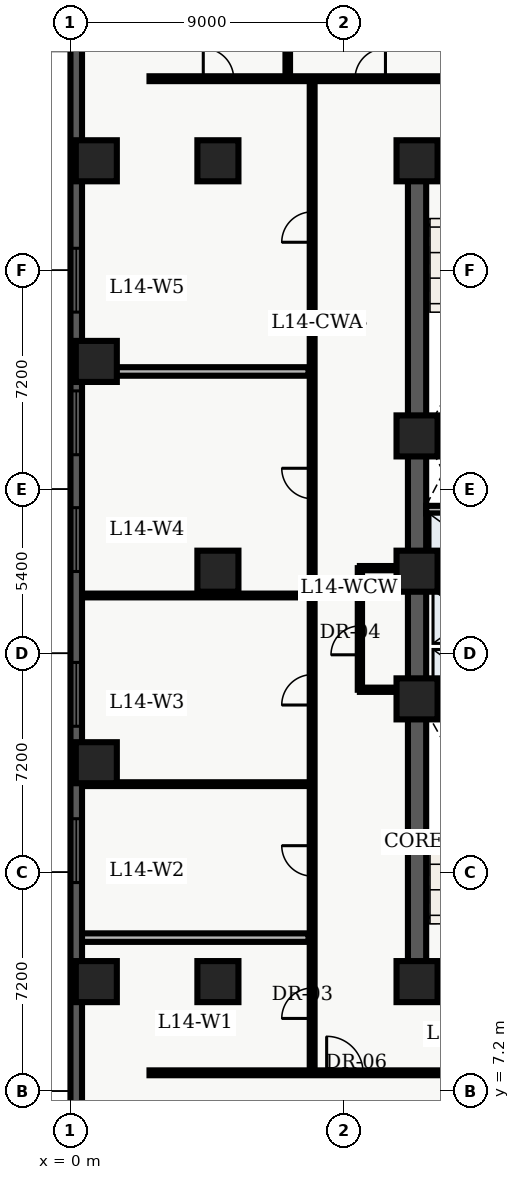
"""IFC4 building model, lengths in metres.
Left out: names, types, materials, properties, quantities, classifications, styles, units other than length and angle.
Written with IfcOpenShell. Run it as: python <this file> out.ifc"""

import sys

from ifc_helpers import new_model, entity, si_unit, converted_unit, direction, frame, origin_with_axes, origin_2d_with_axis, place, context, subcontext, project, spatial, polyline, rectangle, outline, extrude, element, fill, save


model = new_model("IFC4")
c1 = context("Model", 3, precision=1e-05, world=origin_with_axes(), true_north=direction((0.0, 1.0)))
c2 = subcontext(c1, "Body", "Model", "MODEL_VIEW")
j1 = project(units=[si_unit("LENGTHUNIT", "METRE"), converted_unit("PLANEANGLEUNIT", "DEGREE", entity("IfcPlaneAngleMeasure", 0.017), si_unit("PLANEANGLEUNIT", "RADIAN"), dimensions=[0, 0, 0, 0, 0, 0, 0])], contexts=[c1])
p1 = place(None, origin_with_axes())
s1 = spatial("IfcSite", under=j1, at=p1, CompositionType="ELEMENT")
p2 = place(p1, origin_with_axes())
s2 = spatial("IfcBuilding", under=s1, at=p2, CompositionType="ELEMENT")
p3 = place(p2, frame((0.0, 0.0, 60.0), z_axis=(0.0, 0.0, 1.0), x_axis=(1.0, 0.0, 0.0)))
s3 = spatial("IfcBuildingStorey", under=s2, at=p3, CompositionType="ELEMENT", Elevation=60.0)
p4 = place(p3, frame((11.4, 10.8, 0.0), z_axis=(0.0, 0.0, 1.0), x_axis=(0.0, 1.0, 0.0)))
e1 = element("IfcWall", 1, at=p4, inside=s3, PredefinedType="SHEAR", context=c2, shape_type="SweptSolid", body=[
    extrude(outline(polyline([(0.0, -0.3), (27.0, -0.3), (27.0, 0.3), (0.0, 0.3), (0.0, -0.3)])), origin_with_axes(), (0.0, 0.0, 1.0), 3.66),
])
p5 = place(p3, frame((11.4, 10.8, 0.0), z_axis=(0.0, 0.0, 1.0), x_axis=(1.0, 0.0, 0.0)))
e2 = element("IfcWall", 2, at=p5, inside=s3, PredefinedType="SHEAR", context=c2, shape_type="SweptSolid", body=[
    extrude(outline(polyline([(0.0, -0.3), (7.2, -0.3), (7.2, 0.3), (0.0, 0.3), (0.0, -0.3)])), origin_with_axes(), (0.0, 0.0, 1.0), 3.66),
])
p6 = place(p5, frame((2.625, 0.0, 0.0), z_axis=(0.0, 0.0, 1.0), x_axis=(1.0, 0.0, 0.0)))
e3 = element("IfcOpeningElement", 3, at=p6, cuts=e2, PredefinedType="OPENING", context=c2, shape_type="SweptSolid", body=[
    extrude(rectangle(XDim=1.05, YDim=0.62, at=origin_2d_with_axis()), origin_with_axes(), (0.0, 0.0, 1.0), 2.15),
])
p7 = place(p3, frame((11.4, 37.8, 0.0), z_axis=(0.0, 0.0, 1.0), x_axis=(1.0, 0.0, 0.0)))
e4 = element("IfcWall", 4, at=p7, inside=s3, PredefinedType="SHEAR", context=c2, shape_type="SweptSolid", body=[
    extrude(outline(polyline([(0.0, -0.3), (7.2, -0.3), (7.2, 0.3), (0.0, 0.3), (0.0, -0.3)])), origin_with_axes(), (0.0, 0.0, 1.0), 3.66),
])
p8 = place(p7, frame((2.625, 0.0, 0.0), z_axis=(0.0, 0.0, 1.0), x_axis=(1.0, 0.0, 0.0)))
e5 = element("IfcOpeningElement", 5, at=p8, cuts=e4, PredefinedType="OPENING", context=c2, shape_type="SweptSolid", body=[
    extrude(rectangle(XDim=1.05, YDim=0.62, at=origin_2d_with_axis()), origin_with_axes(), (0.0, 0.0, 1.0), 2.15),
])
for number, where, z_axis, x_axis in (
    (6, (11.7, 19.825, 0.0), (0.0, 0.0, 1.0), (1.0, 0.0, 0.0)),
    (7, (11.7, 28.775, 0.0), (0.0, 0.0, 1.0), (1.0, 0.0, 0.0)),
):
    element("IfcWall", number, at=place(p3, frame(where, z_axis=z_axis, x_axis=x_axis)), inside=s3, PredefinedType="SHEAR", context=c2, shape_type="SweptSolid", body=[
        extrude(outline(polyline([(0.0, -0.125), (6.6, -0.125), (6.6, 0.125), (0.0, 0.125), (0.0, -0.125)])), origin_with_axes(), (0.0, 0.0, 1.0), 3.66),
    ])
p9 = place(p3, frame((11.7, 24.1, 0.0), z_axis=(0.0, 0.0, 1.0), x_axis=(1.0, 0.0, 0.0)))
e8 = element("IfcWall", 8, at=p9, inside=s3, PredefinedType="SOLIDWALL", context=c2, shape_type="SweptSolid", body=[
    extrude(outline(polyline([(0.0, -0.125), (6.6, -0.125), (6.6, 0.125), (0.0, 0.125), (0.0, -0.125)])), origin_with_axes(), (0.0, 0.0, 1.0), 2.7),
])
p10 = place(p9, frame((3.75, 0.0, 0.0), z_axis=(0.0, 0.0, 1.0), x_axis=(1.0, 0.0, 0.0)))
e9 = element("IfcOpeningElement", 9, at=p10, cuts=e8, PredefinedType="OPENING", context=c2, shape_type="SweptSolid", body=[
    extrude(rectangle(XDim=0.9, YDim=0.27, at=origin_2d_with_axis()), origin_with_axes(), (0.0, 0.0, 1.0), 2.15),
])
p11 = place(p3, frame((11.7, 26.325, 0.0), z_axis=(0.0, 0.0, 1.0), x_axis=(1.0, 0.0, 0.0)))
e10 = element("IfcWall", 10, at=p11, inside=s3, PredefinedType="SOLIDWALL", context=c2, shape_type="SweptSolid", body=[
    extrude(outline(polyline([(0.0, -0.125), (6.6, -0.125), (6.6, 0.125), (0.0, 0.125), (0.0, -0.125)])), origin_with_axes(), (0.0, 0.0, 1.0), 2.7),
])
p12 = place(p11, frame((3.5, 0.0, 0.0), z_axis=(0.0, 0.0, 1.0), x_axis=(1.0, 0.0, 0.0)))
e11 = element("IfcOpeningElement", 11, at=p12, cuts=e10, PredefinedType="OPENING", context=c2, shape_type="SweptSolid", body=[
    extrude(rectangle(XDim=0.9, YDim=0.27, at=origin_2d_with_axis()), origin_with_axes(), (0.0, 0.0, 1.0), 2.15),
])
for number, where, z_axis, x_axis in (
    (12, (11.4, 10.8, 0.0), (0.0, 0.0, 1.0), (1.0, 0.0, 0.0)),
    (13, (11.4, 20.1, 0.0), (0.0, 0.0, 1.0), (1.0, 0.0, 0.0)),
    (14, (11.4, 24.3, 0.0), (0.0, 0.0, 1.0), (1.0, 0.0, 0.0)),
    (15, (11.4, 28.75, 0.0), (0.0, 0.0, 1.0), (1.0, 0.0, 0.0)),
    (16, (11.4, 37.8, 0.0), (0.0, 0.0, 1.0), (1.0, 0.0, 0.0)),
    (17, (4.85, 10.8, 0.0), (0.0, 0.0, 1.0), (1.0, 0.0, 0.0)),
    (18, (4.85, 24.3, 0.0), (0.0, 0.0, 1.0), (1.0, 0.0, 0.0)),
    (19, (4.85, 37.8, 0.0), (0.0, 0.0, 1.0), (1.0, 0.0, 0.0)),
    (20, (0.85, 10.8, 0.0), (0.0, 0.0, 1.0), (1.0, 0.0, 0.0)),
    (21, (0.85, 18.0, 0.0), (0.0, 0.0, 1.0), (1.0, 0.0, 0.0)),
    (22, (0.85, 31.2, 0.0), (0.0, 0.0, 1.0), (1.0, 0.0, 0.0)),
    (23, (0.85, 37.8, 0.0), (0.0, 0.0, 1.0), (1.0, 0.0, 0.0)),
):
    element("IfcColumn", number, at=place(p3, frame(where, z_axis=z_axis, x_axis=x_axis)), inside=s3, PredefinedType="COLUMN", context=c2, shape_type="SweptSolid", body=[
        extrude(rectangle(XDim=1.35, YDim=1.35, at=origin_2d_with_axis()), origin_with_axes(), (0.0, 0.0, 1.0), 3.9),
    ])
p13 = place(p3, frame((9.52, 20.4, 0.0), z_axis=(0.0, 0.0, 1.0), x_axis=(0.0, 1.0, 0.0)))
e24 = element("IfcWall", 24, at=p13, inside=s3, PredefinedType="PARTITIONING", context=c2, shape_type="SweptSolid", body=[
    extrude(outline(polyline([(0.0, -0.07), (4.0, -0.07), (4.0, 0.07), (0.0, 0.07), (0.0, -0.07)])), origin_with_axes(), (0.0, 0.0, 1.0), 2.7),
])
p14 = place(p13, frame((1.625, 0.0, 0.0), z_axis=(0.0, 0.0, 1.0), x_axis=(1.0, 0.0, 0.0)))
e25 = element("IfcOpeningElement", 25, at=p14, cuts=e24, PredefinedType="OPENING", context=c2, shape_type="SweptSolid", body=[
    extrude(rectangle(XDim=0.95, YDim=0.16, at=origin_2d_with_axis()), origin_with_axes(), (0.0, 0.0, 1.0), 2.15),
])
for number, where, z_axis, x_axis in (
    (26, (9.52, 20.4, 0.0), (0.0, 0.0, 1.0), (1.0, 0.0, 0.0)),
    (27, (9.52, 24.4, 0.0), (0.0, 0.0, 1.0), (1.0, 0.0, 0.0)),
):
    element("IfcWall", number, at=place(p3, frame(where, z_axis=z_axis, x_axis=x_axis)), inside=s3, PredefinedType="PARTITIONING", context=c2, shape_type="SweptSolid", body=[
        extrude(outline(polyline([(0.0, -0.07), (1.58, -0.07), (1.58, 0.07), (0.0, 0.07), (0.0, -0.07)])), origin_with_axes(), (0.0, 0.0, 1.0), 2.7),
    ])
p15 = place(p3, frame((2.6, 7.8, 0.0), z_axis=(0.0, 0.0, 1.0), x_axis=(1.0, 0.0, 0.0)))
e28 = element("IfcWall", 28, at=p15, inside=s3, PredefinedType="PARTITIONING", context=c2, shape_type="SweptSolid", body=[
    extrude(outline(polyline([(0.0, -0.08), (18.55, -0.08), (18.55, 0.08), (0.0, 0.08), (0.0, -0.08)])), origin_with_axes(), (0.0, 0.0, 1.0), 2.7),
])
p16 = place(p15, frame((6.426, 0.0, 0.0), z_axis=(0.0, 0.0, 1.0), x_axis=(1.0, 0.0, 0.0)))
e29 = element("IfcOpeningElement", 29, at=p16, cuts=e28, PredefinedType="OPENING", context=c2, shape_type="SweptSolid", body=[
    extrude(rectangle(XDim=1.2, YDim=0.18, at=origin_2d_with_axis()), origin_with_axes(), (0.0, 0.0, 1.0), 2.2),
])
p17 = place(p15, frame((15.681, 0.0, 0.0), z_axis=(0.0, 0.0, 1.0), x_axis=(1.0, 0.0, 0.0)))
e30 = element("IfcOpeningElement", 30, at=p17, cuts=e28, PredefinedType="OPENING", context=c2, shape_type="SweptSolid", body=[
    extrude(rectangle(XDim=1.0, YDim=0.18, at=origin_2d_with_axis()), origin_with_axes(), (0.0, 0.0, 1.0), 2.15),
])
p18 = place(p3, frame((2.6, 40.5, 0.0), z_axis=(0.0, 0.0, 1.0), x_axis=(1.0, 0.0, 0.0)))
e31 = element("IfcWall", 31, at=p18, inside=s3, PredefinedType="PARTITIONING", context=c2, shape_type="SweptSolid", body=[
    extrude(outline(polyline([(0.0, -0.08), (18.65, -0.08), (18.65, 0.08), (0.0, 0.08), (0.0, -0.08)])), origin_with_axes(), (0.0, 0.0, 1.0), 2.7),
])
p19 = place(p18, frame((2.268, 0.0, 0.0), z_axis=(0.0, 0.0, 1.0), x_axis=(1.0, 0.0, 0.0)))
e32 = element("IfcOpeningElement", 32, at=p19, cuts=e31, PredefinedType="OPENING", context=c2, shape_type="SweptSolid", body=[
    extrude(rectangle(XDim=1.0, YDim=0.18, at=origin_2d_with_axis()), origin_with_axes(), (0.0, 0.0, 1.0), 2.15),
])
p20 = place(p18, frame((7.261, 0.0, 0.0), z_axis=(0.0, 0.0, 1.0), x_axis=(1.0, 0.0, 0.0)))
e33 = element("IfcOpeningElement", 33, at=p20, cuts=e31, PredefinedType="OPENING", context=c2, shape_type="SweptSolid", body=[
    extrude(rectangle(XDim=1.0, YDim=0.18, at=origin_2d_with_axis()), origin_with_axes(), (0.0, 0.0, 1.0), 2.15),
])
p21 = place(p18, frame((13.197, 0.0, 0.0), z_axis=(0.0, 0.0, 1.0), x_axis=(1.0, 0.0, 0.0)))
e34 = element("IfcOpeningElement", 34, at=p21, cuts=e31, PredefinedType="OPENING", context=c2, shape_type="SweptSolid", body=[
    extrude(rectangle(XDim=1.0, YDim=0.18, at=origin_2d_with_axis()), origin_with_axes(), (0.0, 0.0, 1.0), 2.15),
])
p22 = place(p3, frame((7.95, 7.8, 0.0), z_axis=(0.0, 0.0, 1.0), x_axis=(0.0, 1.0, 0.0)))
e35 = element("IfcWall", 35, at=p22, inside=s3, PredefinedType="PARTITIONING", context=c2, shape_type="SweptSolid", body=[
    extrude(outline(polyline([(0.0, -0.08), (32.7, -0.08), (32.7, 0.08), (0.0, 0.08), (0.0, -0.08)])), origin_with_axes(), (0.0, 0.0, 1.0), 2.7),
])
p23 = place(p22, frame((2.288, 0.0, 0.0), z_axis=(0.0, 0.0, 1.0), x_axis=(1.0, 0.0, 0.0)))
e36 = element("IfcOpeningElement", 36, at=p23, cuts=e35, PredefinedType="OPENING", context=c2, shape_type="SweptSolid", body=[
    extrude(rectangle(XDim=1.0, YDim=0.18, at=origin_2d_with_axis()), origin_with_axes(), (0.0, 0.0, 1.0), 2.15),
])
p24 = place(p22, frame((6.971, 0.0, 0.0), z_axis=(0.0, 0.0, 1.0), x_axis=(1.0, 0.0, 0.0)))
e37 = element("IfcOpeningElement", 37, at=p24, cuts=e35, PredefinedType="OPENING", context=c2, shape_type="SweptSolid", body=[
    extrude(rectangle(XDim=1.0, YDim=0.18, at=origin_2d_with_axis()), origin_with_axes(), (0.0, 0.0, 1.0), 2.15),
])
p25 = place(p22, frame((12.598, 0.0, 0.0), z_axis=(0.0, 0.0, 1.0), x_axis=(1.0, 0.0, 0.0)))
e38 = element("IfcOpeningElement", 38, at=p25, cuts=e35, PredefinedType="OPENING", context=c2, shape_type="SweptSolid", body=[
    extrude(rectangle(XDim=1.0, YDim=0.18, at=origin_2d_with_axis()), origin_with_axes(), (0.0, 0.0, 1.0), 2.15),
])
p26 = place(p22, frame((19.386, 0.0, 0.0), z_axis=(0.0, 0.0, 1.0), x_axis=(1.0, 0.0, 0.0)))
e39 = element("IfcOpeningElement", 39, at=p26, cuts=e35, PredefinedType="OPENING", context=c2, shape_type="SweptSolid", body=[
    extrude(rectangle(XDim=1.0, YDim=0.18, at=origin_2d_with_axis()), origin_with_axes(), (0.0, 0.0, 1.0), 2.15),
])
p27 = place(p22, frame((27.82, 0.0, 0.0), z_axis=(0.0, 0.0, 1.0), x_axis=(1.0, 0.0, 0.0)))
e40 = element("IfcOpeningElement", 40, at=p27, cuts=e35, PredefinedType="OPENING", context=c2, shape_type="SweptSolid", body=[
    extrude(rectangle(XDim=1.0, YDim=0.18, at=origin_2d_with_axis()), origin_with_axes(), (0.0, 0.0, 1.0), 2.15),
])
p28 = place(p3, frame((0.375, 12.247, 0.0), z_axis=(0.0, 0.0, 1.0), x_axis=(1.0, 0.0, 0.0)))
e41 = element("IfcWall", 41, at=p28, inside=s3, PredefinedType="PARTITIONING", context=c2, shape_type="SweptSolid", body=[
    extrude(outline(polyline([(0.0, -0.14), (7.455, -0.14), (7.455, 0.14), (0.0, 0.14), (0.0, -0.14)])), origin_with_axes(), (0.0, 0.0, 1.0), 2.7),
])
for number, where, z_axis, x_axis in (
    (42, (0.375, 17.295, 0.0), (0.0, 0.0, 1.0), (1.0, 0.0, 0.0)),
    (43, (0.375, 23.501, 0.0), (0.0, 0.0, 1.0), (1.0, 0.0, 0.0)),
):
    element("IfcWall", number, at=place(p3, frame(where, z_axis=z_axis, x_axis=x_axis)), inside=s3, PredefinedType="PARTITIONING", context=c2, shape_type="SweptSolid", body=[
        extrude(outline(polyline([(0.0, -0.062), (7.455, -0.062), (7.455, 0.062), (0.0, 0.062), (0.0, -0.062)])), origin_with_axes(), (0.0, 0.0, 1.0), 2.7),
    ])
p29 = place(p3, frame((0.375, 30.87, 0.0), z_axis=(0.0, 0.0, 1.0), x_axis=(1.0, 0.0, 0.0)))
e44 = element("IfcWall", 44, at=p29, inside=s3, PredefinedType="PARTITIONING", context=c2, shape_type="SweptSolid", body=[
    extrude(outline(polyline([(0.0, -0.14), (7.455, -0.14), (7.455, 0.14), (0.0, 0.14), (0.0, -0.14)])), origin_with_axes(), (0.0, 0.0, 1.0), 2.7),
])
p30 = place(p3, frame((7.147, 40.6, 0.0), z_axis=(0.0, 0.0, 1.0), x_axis=(0.0, 1.0, 0.0)))
e45 = element("IfcWall", 45, at=p30, inside=s3, PredefinedType="PARTITIONING", context=c2, shape_type="SweptSolid", body=[
    extrude(outline(polyline([(0.0, -0.075), (7.64, -0.075), (7.64, 0.075), (0.0, 0.075), (0.0, -0.075)])), origin_with_axes(), (0.0, 0.0, 1.0), 2.7),
])
p31 = place(p3, frame((0.19, 2.78, 0.0), z_axis=(0.0, 0.0, 1.0), x_axis=(0.0, 1.0, 0.0)))
e46 = element("IfcWall", 46, at=p31, inside=s3, PredefinedType="SOLIDWALL", context=c2, shape_type="SweptSolid", body=[
    extrude(outline(polyline([(0.0, -0.19), (43.42, -0.19), (43.42, 0.19), (0.0, 0.19), (0.0, -0.19)])), origin_with_axes(), (0.0, 0.0, 1.0), 3.66),
])
p32 = place(p31, frame((2.946, 0.0, 0.45), z_axis=(0.0, 0.0, 1.0), x_axis=(1.0, 0.0, 0.0)))
e47 = element("IfcOpeningElement", 47, at=p32, cuts=e46, PredefinedType="OPENING", context=c2, shape_type="SweptSolid", body=[
    extrude(rectangle(XDim=2.1, YDim=0.4, at=origin_2d_with_axis()), origin_with_axes(), (0.0, 0.0, 1.0), 2.2),
])
p33 = place(p31, frame((12.328, 0.0, 0.45), z_axis=(0.0, 0.0, 1.0), x_axis=(1.0, 0.0, 0.0)))
e48 = element("IfcOpeningElement", 48, at=p33, cuts=e46, PredefinedType="OPENING", context=c2, shape_type="SweptSolid", body=[
    extrude(rectangle(XDim=2.1, YDim=0.4, at=origin_2d_with_axis()), origin_with_axes(), (0.0, 0.0, 1.0), 2.2),
])
p34 = place(p31, frame((17.469, 0.0, 0.45), z_axis=(0.0, 0.0, 1.0), x_axis=(1.0, 0.0, 0.0)))
e49 = element("IfcOpeningElement", 49, at=p34, cuts=e46, PredefinedType="OPENING", context=c2, shape_type="SweptSolid", body=[
    extrude(rectangle(XDim=2.1, YDim=0.4, at=origin_2d_with_axis()), origin_with_axes(), (0.0, 0.0, 1.0), 2.2),
])
p35 = place(p31, frame((22.56, 0.0, 0.45), z_axis=(0.0, 0.0, 1.0), x_axis=(1.0, 0.0, 0.0)))
e50 = element("IfcOpeningElement", 50, at=p35, cuts=e46, PredefinedType="OPENING", context=c2, shape_type="SweptSolid", body=[
    extrude(rectangle(XDim=2.1, YDim=0.4, at=origin_2d_with_axis()), origin_with_axes(), (0.0, 0.0, 1.0), 2.2),
])
p36 = place(p31, frame((26.401, 0.0, 0.45), z_axis=(0.0, 0.0, 1.0), x_axis=(1.0, 0.0, 0.0)))
e51 = element("IfcOpeningElement", 51, at=p36, cuts=e46, PredefinedType="OPENING", context=c2, shape_type="SweptSolid", body=[
    extrude(rectangle(XDim=2.1, YDim=0.4, at=origin_2d_with_axis()), origin_with_axes(), (0.0, 0.0, 1.0), 2.2),
])
p37 = place(p31, frame((31.092, 0.0, 0.45), z_axis=(0.0, 0.0, 1.0), x_axis=(1.0, 0.0, 0.0)))
e52 = element("IfcOpeningElement", 52, at=p37, cuts=e46, PredefinedType="OPENING", context=c2, shape_type="SweptSolid", body=[
    extrude(rectangle(XDim=2.1, YDim=0.4, at=origin_2d_with_axis()), origin_with_axes(), (0.0, 0.0, 1.0), 2.2),
])
p38 = place(p31, frame((40.024, 0.0, 0.45), z_axis=(0.0, 0.0, 1.0), x_axis=(1.0, 0.0, 0.0)))
e53 = element("IfcOpeningElement", 53, at=p38, cuts=e46, PredefinedType="OPENING", context=c2, shape_type="SweptSolid", body=[
    extrude(rectangle(XDim=2.1, YDim=0.4, at=origin_2d_with_axis()), origin_with_axes(), (0.0, 0.0, 1.0), 2.2),
])
p39 = place(p13, frame((1.625, 0.0, 0.0), z_axis=(0.0, 0.0, 1.0), x_axis=(1.0, 0.0, 0.0)))
e54 = element("IfcDoor", 54, at=p39, inside=s3, OperationType="SINGLE_SWING_LEFT", PredefinedType="DOOR", context=c2, shape_type="SweptSolid", body=[
    extrude(rectangle(XDim=0.95, YDim=0.084, at=origin_2d_with_axis()), origin_with_axes(), (0.0, 0.0, 1.0), 2.15),
])
fill(e25, e54)
p40 = place(p22, frame((2.288, 0.0, 0.0), z_axis=(0.0, 0.0, 1.0), x_axis=(1.0, 0.0, 0.0)))
e55 = element("IfcDoor", 55, at=p40, inside=s3, OperationType="SINGLE_SWING_LEFT", PredefinedType="DOOR", context=c2, shape_type="SweptSolid", body=[
    extrude(rectangle(XDim=1.0, YDim=0.09, at=origin_2d_with_axis()), origin_with_axes(), (0.0, 0.0, 1.0), 2.15),
])
fill(e36, e55)
p41 = place(p22, frame((6.971, 0.0, 0.0), z_axis=(0.0, 0.0, 1.0), x_axis=(1.0, 0.0, 0.0)))
e56 = element("IfcDoor", 56, at=p41, inside=s3, OperationType="SINGLE_SWING_RIGHT", PredefinedType="DOOR", context=c2, shape_type="SweptSolid", body=[
    extrude(rectangle(XDim=1.0, YDim=0.09, at=origin_2d_with_axis()), origin_with_axes(), (0.0, 0.0, 1.0), 2.15),
])
fill(e37, e56)
p42 = place(p22, frame((12.598, 0.0, 0.0), z_axis=(0.0, 0.0, 1.0), x_axis=(1.0, 0.0, 0.0)))
e57 = element("IfcDoor", 57, at=p42, inside=s3, OperationType="SINGLE_SWING_LEFT", PredefinedType="DOOR", context=c2, shape_type="SweptSolid", body=[
    extrude(rectangle(XDim=1.0, YDim=0.09, at=origin_2d_with_axis()), origin_with_axes(), (0.0, 0.0, 1.0), 2.15),
])
fill(e38, e57)
p43 = place(p22, frame((19.386, 0.0, 0.0), z_axis=(0.0, 0.0, 1.0), x_axis=(1.0, 0.0, 0.0)))
e58 = element("IfcDoor", 58, at=p43, inside=s3, OperationType="SINGLE_SWING_RIGHT", PredefinedType="DOOR", context=c2, shape_type="SweptSolid", body=[
    extrude(rectangle(XDim=1.0, YDim=0.09, at=origin_2d_with_axis()), origin_with_axes(), (0.0, 0.0, 1.0), 2.15),
])
fill(e39, e58)
p44 = place(p22, frame((27.82, 0.0, 0.0), z_axis=(0.0, 0.0, 1.0), x_axis=(1.0, 0.0, 0.0)))
e59 = element("IfcDoor", 59, at=p44, inside=s3, OperationType="SINGLE_SWING_LEFT", PredefinedType="DOOR", context=c2, shape_type="SweptSolid", body=[
    extrude(rectangle(XDim=1.0, YDim=0.09, at=origin_2d_with_axis()), origin_with_axes(), (0.0, 0.0, 1.0), 2.15),
])
fill(e40, e59)
p45 = place(p15, frame((6.426, 0.0, 0.0), z_axis=(0.0, 0.0, 1.0), x_axis=(1.0, 0.0, 0.0)))
e60 = element("IfcDoor", 60, at=p45, inside=s3, OperationType="SINGLE_SWING_LEFT", PredefinedType="DOOR", context=c2, shape_type="SweptSolid", body=[
    extrude(rectangle(XDim=1.2, YDim=0.09, at=origin_2d_with_axis()), origin_with_axes(), (0.0, 0.0, 1.0), 2.2),
])
fill(e29, e60)
p46 = place(p18, frame((2.268, 0.0, 0.0), z_axis=(0.0, 0.0, 1.0), x_axis=(1.0, 0.0, 0.0)))
e61 = element("IfcDoor", 61, at=p46, inside=s3, OperationType="SINGLE_SWING_LEFT", PredefinedType="DOOR", context=c2, shape_type="SweptSolid", body=[
    extrude(rectangle(XDim=1.0, YDim=0.09, at=origin_2d_with_axis()), origin_with_axes(), (0.0, 0.0, 1.0), 2.15),
])
fill(e32, e61)
p47 = place(p18, frame((7.261, 0.0, 0.0), z_axis=(0.0, 0.0, 1.0), x_axis=(1.0, 0.0, 0.0)))
e62 = element("IfcDoor", 62, at=p47, inside=s3, OperationType="SINGLE_SWING_RIGHT", PredefinedType="DOOR", context=c2, shape_type="SweptSolid", body=[
    extrude(rectangle(XDim=1.0, YDim=0.09, at=origin_2d_with_axis()), origin_with_axes(), (0.0, 0.0, 1.0), 2.15),
])
fill(e33, e62)
p48 = place(p31, frame((12.328, 0.0, 0.45), z_axis=(0.0, 0.0, 1.0), x_axis=(1.0, 0.0, 0.0)))
e63 = element("IfcWindow", 63, at=p48, inside=s3, PredefinedType="WINDOW", context=c2, shape_type="SweptSolid", body=[
    extrude(rectangle(XDim=2.1, YDim=0.09, at=origin_2d_with_axis()), origin_with_axes(), (0.0, 0.0, 1.0), 2.2),
])
fill(e48, e63)
p49 = place(p31, frame((17.469, 0.0, 0.45), z_axis=(0.0, 0.0, 1.0), x_axis=(1.0, 0.0, 0.0)))
e64 = element("IfcWindow", 64, at=p49, inside=s3, PredefinedType="WINDOW", context=c2, shape_type="SweptSolid", body=[
    extrude(rectangle(XDim=2.1, YDim=0.09, at=origin_2d_with_axis()), origin_with_axes(), (0.0, 0.0, 1.0), 2.2),
])
fill(e49, e64)
p50 = place(p31, frame((22.56, 0.0, 0.45), z_axis=(0.0, 0.0, 1.0), x_axis=(1.0, 0.0, 0.0)))
e65 = element("IfcWindow", 65, at=p50, inside=s3, PredefinedType="WINDOW", context=c2, shape_type="SweptSolid", body=[
    extrude(rectangle(XDim=2.1, YDim=0.09, at=origin_2d_with_axis()), origin_with_axes(), (0.0, 0.0, 1.0), 2.2),
])
fill(e50, e65)
p51 = place(p31, frame((26.401, 0.0, 0.45), z_axis=(0.0, 0.0, 1.0), x_axis=(1.0, 0.0, 0.0)))
e66 = element("IfcWindow", 66, at=p51, inside=s3, PredefinedType="WINDOW", context=c2, shape_type="SweptSolid", body=[
    extrude(rectangle(XDim=2.1, YDim=0.09, at=origin_2d_with_axis()), origin_with_axes(), (0.0, 0.0, 1.0), 2.2),
])
fill(e51, e66)
p52 = place(p31, frame((31.092, 0.0, 0.45), z_axis=(0.0, 0.0, 1.0), x_axis=(1.0, 0.0, 0.0)))
e67 = element("IfcWindow", 67, at=p52, inside=s3, PredefinedType="WINDOW", context=c2, shape_type="SweptSolid", body=[
    extrude(rectangle(XDim=2.1, YDim=0.09, at=origin_2d_with_axis()), origin_with_axes(), (0.0, 0.0, 1.0), 2.2),
])
fill(e52, e67)
save(model, sys.argv[1])
